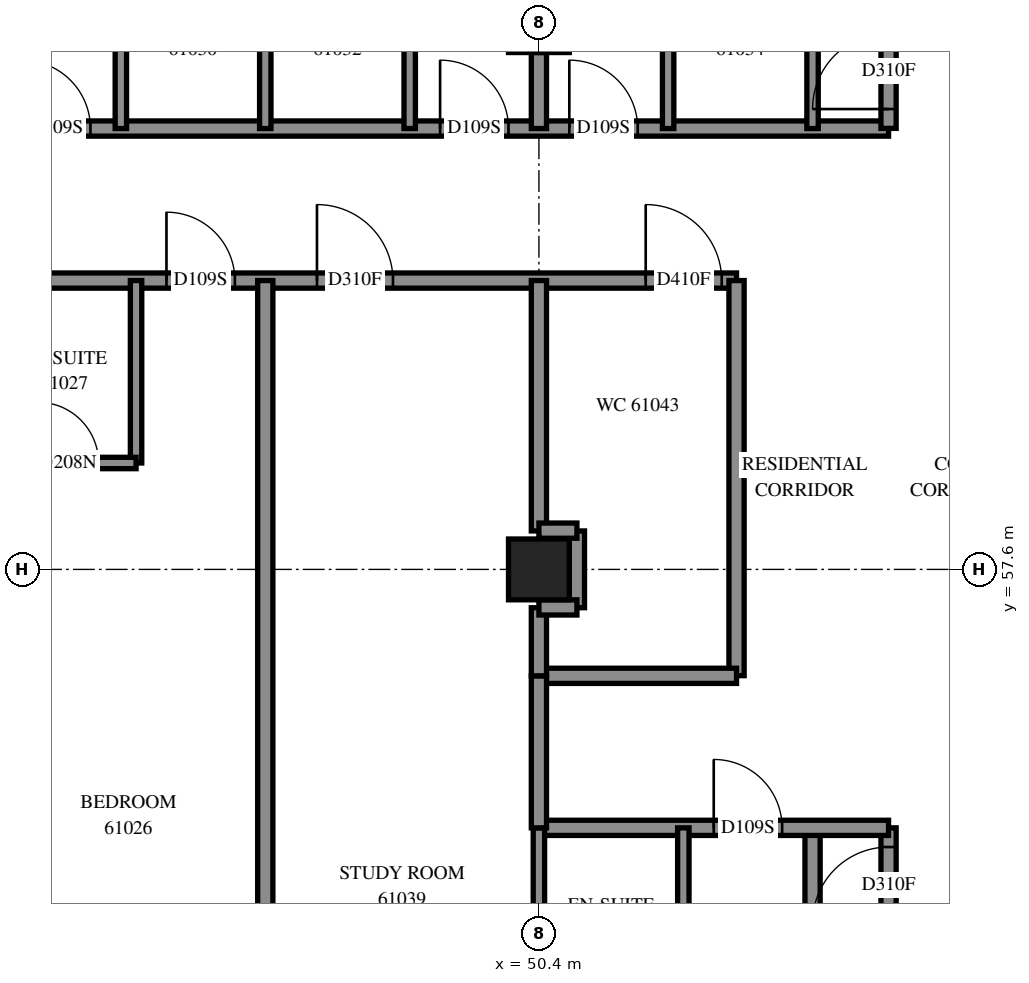
"""IFC4 building model, lengths in metres.
Left out: names, types, materials, properties, quantities, classifications, styles, units other than length and angle.
Written with IfcOpenShell. Run it as: python <this file> out.ifc"""

import sys

from ifc_helpers import new_model, si_unit, direction, frame, frame_2d, origin, origin_2d, place, context, subcontext, project, spatial, rectangle, extrude, element, fill, save


model = new_model("IFC4")
c1 = context("Model", 3, precision=1e-05, world=origin(), true_north=direction((0.0, 1.0)))
c2 = subcontext(c1, "Body", "Model", "MODEL_VIEW")
j1 = project(units=[si_unit("LENGTHUNIT", "METRE"), si_unit("PLANEANGLEUNIT", "RADIAN")], contexts=[c1])
p1 = place(None, origin())
s1 = spatial("IfcSite", under=j1, at=p1, CompositionType="ELEMENT")
p2 = place(p1, origin())
s2 = spatial("IfcBuilding", under=s1, at=p2, CompositionType="ELEMENT")
p3 = place(p2, frame((0.0, 0.0, 223.6)))
s3 = spatial("IfcBuildingStorey", under=s2, at=p3, CompositionType="ELEMENT", Elevation=223.6)
for number, where, z_axis, x_axis in (
    (1, (50.4, 57.6, 0.0), (0.0, 0.0, 1.0), (1.0, 0.0, 0.0)),
    (2, (50.4, 64.8, 0.0), (0.0, 0.0, 1.0), (1.0, 0.0, 0.0)),
):
    element("IfcColumn", number, at=place(p3, frame(where, z_axis=z_axis, x_axis=x_axis)), inside=s3, PredefinedType="COLUMN", context=c2, shape_type="SweptSolid", body=[
        extrude(rectangle(XDim=0.8, YDim=0.8, at=origin_2d()), origin(), (0.0, 0.0, 1.0), 3.1),
    ])
p4 = place(p3, frame((36.0, 61.4, 0.0), z_axis=(0.0, 0.0, 1.0), x_axis=(1.0, 0.0, 0.0)))
e3 = element("IfcWall", 3, at=p4, inside=s3, PredefinedType="PARTITIONING", context=c2, shape_type="SweptSolid", body=[
    extrude(rectangle(XDim=17.0, YDim=0.2, at=frame_2d((8.5, 0.0))), origin(), (0.0, 0.0, 1.0), 3.1),
])
p5 = place(p4, frame((2.3, 0.0, 0.0)))
e4 = element("IfcOpeningElement", 4, at=p5, cuts=e3, PredefinedType="OPENING", context=c2, shape_type="SweptSolid", body=[
    extrude(rectangle(XDim=0.9, YDim=2.1, at=frame_2d((0.45, 1.05))), frame((0.0, 0.11, 0.0), z_axis=(0.0, -1.0, 0.0), x_axis=(1.0, 0.0, 0.0)), (0.0, 0.0, 1.0), 0.22),
])
p6 = place(p4, frame((4.125, 0.0, 0.0)))
e5 = element("IfcOpeningElement", 5, at=p6, cuts=e3, PredefinedType="OPENING", context=c2, shape_type="SweptSolid", body=[
    extrude(rectangle(XDim=1.0, YDim=2.1, at=frame_2d((0.5, 1.05))), frame((0.0, 0.11, 0.0), z_axis=(0.0, -1.0, 0.0), x_axis=(1.0, 0.0, 0.0)), (0.0, 0.0, 1.0), 0.22),
])
p7 = place(p4, frame((9.5, 0.0, 0.0)))
e6 = element("IfcOpeningElement", 6, at=p7, cuts=e3, PredefinedType="OPENING", context=c2, shape_type="SweptSolid", body=[
    extrude(rectangle(XDim=0.9, YDim=2.1, at=frame_2d((0.45, 1.05))), frame((0.0, 0.11, 0.0), z_axis=(0.0, -1.0, 0.0), x_axis=(1.0, 0.0, 0.0)), (0.0, 0.0, 1.0), 0.22),
])
p8 = place(p4, frame((11.48, 0.0, 0.0)))
e7 = element("IfcOpeningElement", 7, at=p8, cuts=e3, PredefinedType="OPENING", context=c2, shape_type="SweptSolid", body=[
    extrude(rectangle(XDim=1.0, YDim=2.1, at=frame_2d((0.5, 1.05))), frame((0.0, 0.11, 0.0), z_axis=(0.0, -1.0, 0.0), x_axis=(1.0, 0.0, 0.0)), (0.0, 0.0, 1.0), 0.22),
])
p9 = place(p4, frame((15.805, 0.0, 0.0)))
e8 = element("IfcOpeningElement", 8, at=p9, cuts=e3, PredefinedType="OPENING", context=c2, shape_type="SweptSolid", body=[
    extrude(rectangle(XDim=1.0, YDim=2.1, at=frame_2d((0.5, 1.05))), frame((0.0, 0.11, 0.0), z_axis=(0.0, -1.0, 0.0), x_axis=(1.0, 0.0, 0.0)), (0.0, 0.0, 1.0), 0.22),
])
p10 = place(p3, frame((40.602, 63.4, 0.0), z_axis=(0.0, 0.0, 1.0), x_axis=(1.0, 0.0, 0.0)))
e9 = element("IfcWall", 9, at=p10, inside=s3, PredefinedType="PARTITIONING", context=c2, shape_type="SweptSolid", body=[
    extrude(rectangle(XDim=14.398, YDim=0.2, at=frame_2d((7.199, 0.0))), origin(), (0.0, 0.0, 1.0), 3.1),
])
p11 = place(p10, frame((2.998, 0.0, 0.0)))
e10 = element("IfcOpeningElement", 10, at=p11, cuts=e9, PredefinedType="OPENING", context=c2, shape_type="SweptSolid", body=[
    extrude(rectangle(XDim=0.9, YDim=2.1, at=frame_2d((0.45, 1.05))), frame((0.0, 0.11, 0.0), z_axis=(0.0, -1.0, 0.0), x_axis=(1.0, 0.0, 0.0)), (0.0, 0.0, 1.0), 0.22),
])
p12 = place(p10, frame((8.498, 0.0, 0.0)))
e11 = element("IfcOpeningElement", 11, at=p12, cuts=e9, PredefinedType="OPENING", context=c2, shape_type="SweptSolid", body=[
    extrude(rectangle(XDim=0.9, YDim=2.1, at=frame_2d((0.45, 1.05))), frame((0.0, 0.11, 0.0), z_axis=(0.0, -1.0, 0.0), x_axis=(1.0, 0.0, 0.0)), (0.0, 0.0, 1.0), 0.22),
])
p13 = place(p10, frame((10.198, 0.0, 0.0)))
e12 = element("IfcOpeningElement", 12, at=p13, cuts=e9, PredefinedType="OPENING", context=c2, shape_type="SweptSolid", body=[
    extrude(rectangle(XDim=0.9, YDim=2.1, at=frame_2d((0.45, 1.05))), frame((0.0, 0.11, 0.0), z_axis=(0.0, -1.0, 0.0), x_axis=(1.0, 0.0, 0.0)), (0.0, 0.0, 1.0), 0.22),
])
p14 = place(p3, frame((54.0, 42.31, 0.0), z_axis=(0.0, 0.0, 1.0), x_axis=(0.0, 1.0, 0.0)))
e13 = element("IfcWall", 13, at=p14, inside=s3, PredefinedType="PARTITIONING", context=c2, shape_type="SweptSolid", body=[
    extrude(rectangle(XDim=11.89, YDim=0.2, at=frame_2d((5.945, 0.0))), origin(), (0.0, 0.0, 1.0), 3.1),
])
p15 = place(p3, frame((46.8, 49.7, 0.0), z_axis=(0.0, 0.0, 1.0), x_axis=(0.0, 1.0, 0.0)))
e14 = element("IfcWall", 14, at=p15, inside=s3, PredefinedType="PARTITIONING", context=c2, shape_type="SweptSolid", body=[
    extrude(rectangle(XDim=11.7, YDim=0.2, at=frame_2d((5.85, 0.0))), origin(), (0.0, 0.0, 1.0), 3.1),
])
p16 = place(p3, frame((55.0, 47.8, 0.0), z_axis=(0.0, 0.0, 1.0), x_axis=(0.0, 1.0, 0.0)))
e15 = element("IfcWall", 15, at=p16, inside=s3, PredefinedType="PARTITIONING", context=c2, shape_type="SweptSolid", body=[
    extrude(rectangle(XDim=6.4, YDim=0.2, at=frame_2d((3.2, 0.0))), origin(), (0.0, 0.0, 1.0), 3.1),
])
p17 = place(p16, frame((5.147, 0.0, 0.0)))
e16 = element("IfcOpeningElement", 16, at=p17, cuts=e15, PredefinedType="OPENING", context=c2, shape_type="SweptSolid", body=[
    extrude(rectangle(XDim=1.0, YDim=2.1, at=frame_2d((0.5, 1.05))), frame((0.0, 0.11, 0.0), z_axis=(0.0, -1.0, 0.0), x_axis=(1.0, 0.0, 0.0)), (0.0, 0.0, 1.0), 0.22),
])
p18 = place(p3, frame((53.0, 56.202, 0.0), z_axis=(0.0, 0.0, 1.0), x_axis=(0.0, 1.0, 0.0)))
e17 = element("IfcWall", 17, at=p18, inside=s3, PredefinedType="PARTITIONING", context=c2, shape_type="SweptSolid", body=[
    extrude(rectangle(XDim=5.198, YDim=0.2, at=frame_2d((2.599, 0.0))), origin(), (0.0, 0.0, 1.0), 3.1),
])
p19 = place(p3, frame((50.4, 54.2, 0.0), z_axis=(0.0, 0.0, 1.0), x_axis=(1.0, 0.0, 0.0)))
e18 = element("IfcWall", 18, at=p19, inside=s3, PredefinedType="PARTITIONING", context=c2, shape_type="SweptSolid", body=[
    extrude(rectangle(XDim=4.6, YDim=0.2, at=frame_2d((2.3, 0.0))), origin(), (0.0, 0.0, 1.0), 3.1),
])
p20 = place(p19, frame((2.3, 0.0, 0.0)))
e19 = element("IfcOpeningElement", 19, at=p20, cuts=e18, PredefinedType="OPENING", context=c2, shape_type="SweptSolid", body=[
    extrude(rectangle(XDim=0.9, YDim=2.1, at=frame_2d((0.45, 1.05))), frame((0.0, 0.11, 0.0), z_axis=(0.0, -1.0, 0.0), x_axis=(1.0, 0.0, 0.0)), (0.0, 0.0, 1.0), 0.22),
])
p21 = place(p3, frame((55.0, 63.402, 0.0), z_axis=(0.0, 0.0, 1.0), x_axis=(0.0, 1.0, 0.0)))
e20 = element("IfcWall", 20, at=p21, inside=s3, PredefinedType="PARTITIONING", context=c2, shape_type="SweptSolid", body=[
    extrude(rectangle(XDim=3.998, YDim=0.2, at=frame_2d((1.999, 0.0))), origin(), (0.0, 0.0, 1.0), 3.1),
])
p22 = place(p21, frame((0.255, 0.0, 0.0)))
e21 = element("IfcOpeningElement", 21, at=p22, cuts=e20, PredefinedType="OPENING", context=c2, shape_type="SweptSolid", body=[
    extrude(rectangle(XDim=1.0, YDim=2.1, at=frame_2d((0.5, 1.05))), frame((0.0, 0.11, 0.0), z_axis=(0.0, -1.0, 0.0), x_axis=(1.0, 0.0, 0.0)), (0.0, 0.0, 1.0), 0.22),
])
p23 = place(p3, frame((50.4, 58.106, 0.0), z_axis=(0.0, 0.0, 1.0), x_axis=(0.0, 1.0, 0.0)))
e22 = element("IfcWall", 22, at=p23, inside=s3, PredefinedType="PARTITIONING", context=c2, shape_type="SweptSolid", body=[
    extrude(rectangle(XDim=3.294, YDim=0.2, at=frame_2d((1.647, 0.0))), origin(), (0.0, 0.0, 1.0), 3.1),
])
p24 = place(p3, frame((50.4, 56.2, 0.0), z_axis=(0.0, 0.0, 1.0), x_axis=(1.0, 0.0, 0.0)))
e23 = element("IfcWall", 23, at=p24, inside=s3, PredefinedType="PARTITIONING", context=c2, shape_type="SweptSolid", body=[
    extrude(rectangle(XDim=2.6, YDim=0.2, at=frame_2d((1.3, 0.0))), origin(), (0.0, 0.0, 1.0), 3.1),
])
for number, where, z_axis, x_axis in (
    (24, (52.3, 51.8, 0.0), (0.0, 0.0, 1.0), (0.0, 1.0, 0.0)),
    (25, (50.4, 51.8, 0.0), (0.0, 0.0, 1.0), (0.0, 1.0, 0.0)),
    (26, (45.1, 59.0, 0.0), (0.0, 0.0, 1.0), (0.0, 1.0, 0.0)),
    (27, (44.9, 63.4, 0.0), (0.0, 0.0, 1.0), (0.0, 1.0, 0.0)),
    (28, (46.8, 63.4, 0.0), (0.0, 0.0, 1.0), (0.0, 1.0, 0.0)),
    (29, (48.7, 63.4, 0.0), (0.0, 0.0, 1.0), (0.0, 1.0, 0.0)),
    (30, (52.1, 63.4, 0.0), (0.0, 0.0, 1.0), (0.0, 1.0, 0.0)),
    (31, (54.0, 63.4, 0.0), (0.0, 0.0, 1.0), (0.0, 1.0, 0.0)),
):
    element("IfcWall", number, at=place(p3, frame(where, z_axis=z_axis, x_axis=x_axis)), inside=s3, PredefinedType="PARTITIONING", context=c2, shape_type="SweptSolid", body=[
        extrude(rectangle(XDim=2.4, YDim=0.15, at=frame_2d((1.2, 0.0))), origin(), (0.0, 0.0, 1.0), 3.1),
    ])
p25 = place(p3, frame((50.4, 54.2, 0.0), z_axis=(0.0, 0.0, 1.0), x_axis=(0.0, 1.0, 0.0)))
e32 = element("IfcWall", 32, at=p25, inside=s3, PredefinedType="PARTITIONING", context=c2, shape_type="SweptSolid", body=[
    extrude(rectangle(XDim=2.0, YDim=0.2, at=frame_2d((1.0, 0.0))), origin(), (0.0, 0.0, 1.0), 3.1),
])
p26 = place(p3, frame((43.2, 59.0, 0.0), z_axis=(0.0, 0.0, 1.0), x_axis=(1.0, 0.0, 0.0)))
e33 = element("IfcWall", 33, at=p26, inside=s3, PredefinedType="PARTITIONING", context=c2, shape_type="SweptSolid", body=[
    extrude(rectangle(XDim=1.9, YDim=0.15, at=frame_2d((0.95, 0.0))), origin(), (0.0, 0.0, 1.0), 3.1),
])
p27 = place(p26, frame((0.607, 0.0, 0.0)))
e34 = element("IfcOpeningElement", 34, at=p27, cuts=e33, PredefinedType="OPENING", context=c2, shape_type="SweptSolid", body=[
    extrude(rectangle(XDim=0.8, YDim=2.1, at=frame_2d((0.4, 1.05))), frame((0.0, 0.085, 0.0), z_axis=(0.0, -1.0, 0.0), x_axis=(1.0, 0.0, 0.0)), (0.0, 0.0, 1.0), 0.17),
])
p28 = place(p3, frame((50.9, 57.096, 0.0), z_axis=(0.0, 0.0, 1.0), x_axis=(0.0, 1.0, 0.0)))
e35 = element("IfcWall", 35, at=p28, inside=s3, PredefinedType="PARTITIONING", context=c2, shape_type="SweptSolid", body=[
    extrude(rectangle(XDim=1.01, YDim=0.2, at=frame_2d((0.505, 0.0))), origin(), (0.0, 0.0, 1.0), 3.1),
])
p29 = place(p3, frame((50.4, 63.4, 0.0), z_axis=(0.0, 0.0, 1.0), x_axis=(0.0, 1.0, 0.0)))
e36 = element("IfcWall", 36, at=p29, inside=s3, PredefinedType="PARTITIONING", context=c2, shape_type="SweptSolid", body=[
    extrude(rectangle(XDim=1.0, YDim=0.2, at=frame_2d((0.5, 0.0))), origin(), (0.0, 0.0, 1.0), 3.1),
])
p30 = place(p3, frame((50.4, 56.2, 0.0), z_axis=(0.0, 0.0, 1.0), x_axis=(0.0, 1.0, 0.0)))
e37 = element("IfcWall", 37, at=p30, inside=s3, PredefinedType="PARTITIONING", context=c2, shape_type="SweptSolid", body=[
    extrude(rectangle(XDim=0.896, YDim=0.2, at=frame_2d((0.448, 0.0))), origin(), (0.0, 0.0, 1.0), 3.1),
])
for number, where, z_axis, x_axis in (
    (38, (50.4, 58.11, 0.0), (0.0, 0.0, 1.0), (1.0, 0.0, 0.0)),
    (39, (50.4, 57.1, 0.0), (0.0, 0.0, 1.0), (1.0, 0.0, 0.0)),
):
    element("IfcWall", number, at=place(p3, frame(where, z_axis=z_axis, x_axis=x_axis)), inside=s3, PredefinedType="PARTITIONING", context=c2, shape_type="SweptSolid", body=[
        extrude(rectangle(XDim=0.5, YDim=0.2, at=frame_2d((0.25, 0.0))), origin(), (0.0, 0.0, 1.0), 3.1),
    ])
p31 = place(p7, origin())
e40 = element("IfcDoor", 40, at=p31, inside=s3, OperationType="SINGLE_SWING_LEFT", PredefinedType="DOOR", context=c2, shape_type="SweptSolid", body=[
    extrude(rectangle(XDim=0.9, YDim=2.1, at=frame_2d((0.45, 1.05))), frame((0.0, 0.025, 0.0), z_axis=(0.0, -1.0, 0.0), x_axis=(1.0, 0.0, 0.0)), (0.0, 0.0, 1.0), 0.05),
])
fill(e6, e40)
p32 = place(p27, origin())
e41 = element("IfcDoor", 41, at=p32, inside=s3, OperationType="SINGLE_SWING_RIGHT", PredefinedType="DOOR", context=c2, shape_type="SweptSolid", body=[
    extrude(rectangle(XDim=0.8, YDim=2.1, at=frame_2d((0.4, 1.05))), frame((0.0, 0.025, 0.0), z_axis=(0.0, -1.0, 0.0), x_axis=(1.0, 0.0, 0.0)), (0.0, 0.0, 1.0), 0.05),
])
fill(e34, e41)
p33 = place(p11, origin())
e42 = element("IfcDoor", 42, at=p33, inside=s3, OperationType="SINGLE_SWING_RIGHT", PredefinedType="DOOR", context=c2, shape_type="SweptSolid", body=[
    extrude(rectangle(XDim=0.9, YDim=2.1, at=frame_2d((0.45, 1.05))), frame((0.0, 0.025, 0.0), z_axis=(0.0, -1.0, 0.0), x_axis=(1.0, 0.0, 0.0)), (0.0, 0.0, 1.0), 0.05),
])
fill(e10, e42)
p34 = place(p12, origin())
e43 = element("IfcDoor", 43, at=p34, inside=s3, OperationType="SINGLE_SWING_LEFT", PredefinedType="DOOR", context=c2, shape_type="SweptSolid", body=[
    extrude(rectangle(XDim=0.9, YDim=2.1, at=frame_2d((0.45, 1.05))), frame((0.0, 0.025, 0.0), z_axis=(0.0, -1.0, 0.0), x_axis=(1.0, 0.0, 0.0)), (0.0, 0.0, 1.0), 0.05),
])
fill(e11, e43)
p35 = place(p13, origin())
e44 = element("IfcDoor", 44, at=p35, inside=s3, OperationType="SINGLE_SWING_RIGHT", PredefinedType="DOOR", context=c2, shape_type="SweptSolid", body=[
    extrude(rectangle(XDim=0.9, YDim=2.1, at=frame_2d((0.45, 1.05))), frame((0.0, 0.025, 0.0), z_axis=(0.0, -1.0, 0.0), x_axis=(1.0, 0.0, 0.0)), (0.0, 0.0, 1.0), 0.05),
])
fill(e12, e44)
p36 = place(p22, origin())
e45 = element("IfcDoor", 45, at=p36, inside=s3, OperationType="SINGLE_SWING_LEFT", PredefinedType="DOOR", context=c2, shape_type="SweptSolid", body=[
    extrude(rectangle(XDim=1.0, YDim=2.1, at=frame_2d((0.5, 1.05))), frame((0.0, 0.025, 0.0), z_axis=(0.0, -1.0, 0.0), x_axis=(1.0, 0.0, 0.0)), (0.0, 0.0, 1.0), 0.05),
])
fill(e21, e45)
p37 = place(p8, origin())
e46 = element("IfcDoor", 46, at=p37, inside=s3, OperationType="SINGLE_SWING_RIGHT", PredefinedType="DOOR", context=c2, shape_type="SweptSolid", body=[
    extrude(rectangle(XDim=1.0, YDim=2.1, at=frame_2d((0.5, 1.05))), frame((0.0, 0.025, 0.0), z_axis=(0.0, -1.0, 0.0), x_axis=(1.0, 0.0, 0.0)), (0.0, 0.0, 1.0), 0.05),
])
fill(e7, e46)
p38 = place(p20, origin())
e47 = element("IfcDoor", 47, at=p38, inside=s3, OperationType="SINGLE_SWING_LEFT", PredefinedType="DOOR", context=c2, shape_type="SweptSolid", body=[
    extrude(rectangle(XDim=0.9, YDim=2.1, at=frame_2d((0.45, 1.05))), frame((0.0, 0.025, 0.0), z_axis=(0.0, -1.0, 0.0), x_axis=(1.0, 0.0, 0.0)), (0.0, 0.0, 1.0), 0.05),
])
fill(e19, e47)
p39 = place(p17, origin())
e48 = element("IfcDoor", 48, at=p39, inside=s3, OperationType="SINGLE_SWING_RIGHT", PredefinedType="DOOR", context=c2, shape_type="SweptSolid", body=[
    extrude(rectangle(XDim=1.0, YDim=2.1, at=frame_2d((0.5, 1.05))), frame((0.0, 0.025, 0.0), z_axis=(0.0, -1.0, 0.0), x_axis=(1.0, 0.0, 0.0)), (0.0, 0.0, 1.0), 0.05),
])
fill(e16, e48)
p40 = place(p9, origin())
e49 = element("IfcDoor", 49, at=p40, inside=s3, OperationType="SINGLE_SWING_LEFT", PredefinedType="DOOR", context=c2, shape_type="SweptSolid", body=[
    extrude(rectangle(XDim=1.0, YDim=2.1, at=frame_2d((0.5, 1.05))), frame((0.0, 0.025, 0.0), z_axis=(0.0, -1.0, 0.0), x_axis=(1.0, 0.0, 0.0)), (0.0, 0.0, 1.0), 0.05),
])
fill(e8, e49)
save(model, sys.argv[1])
